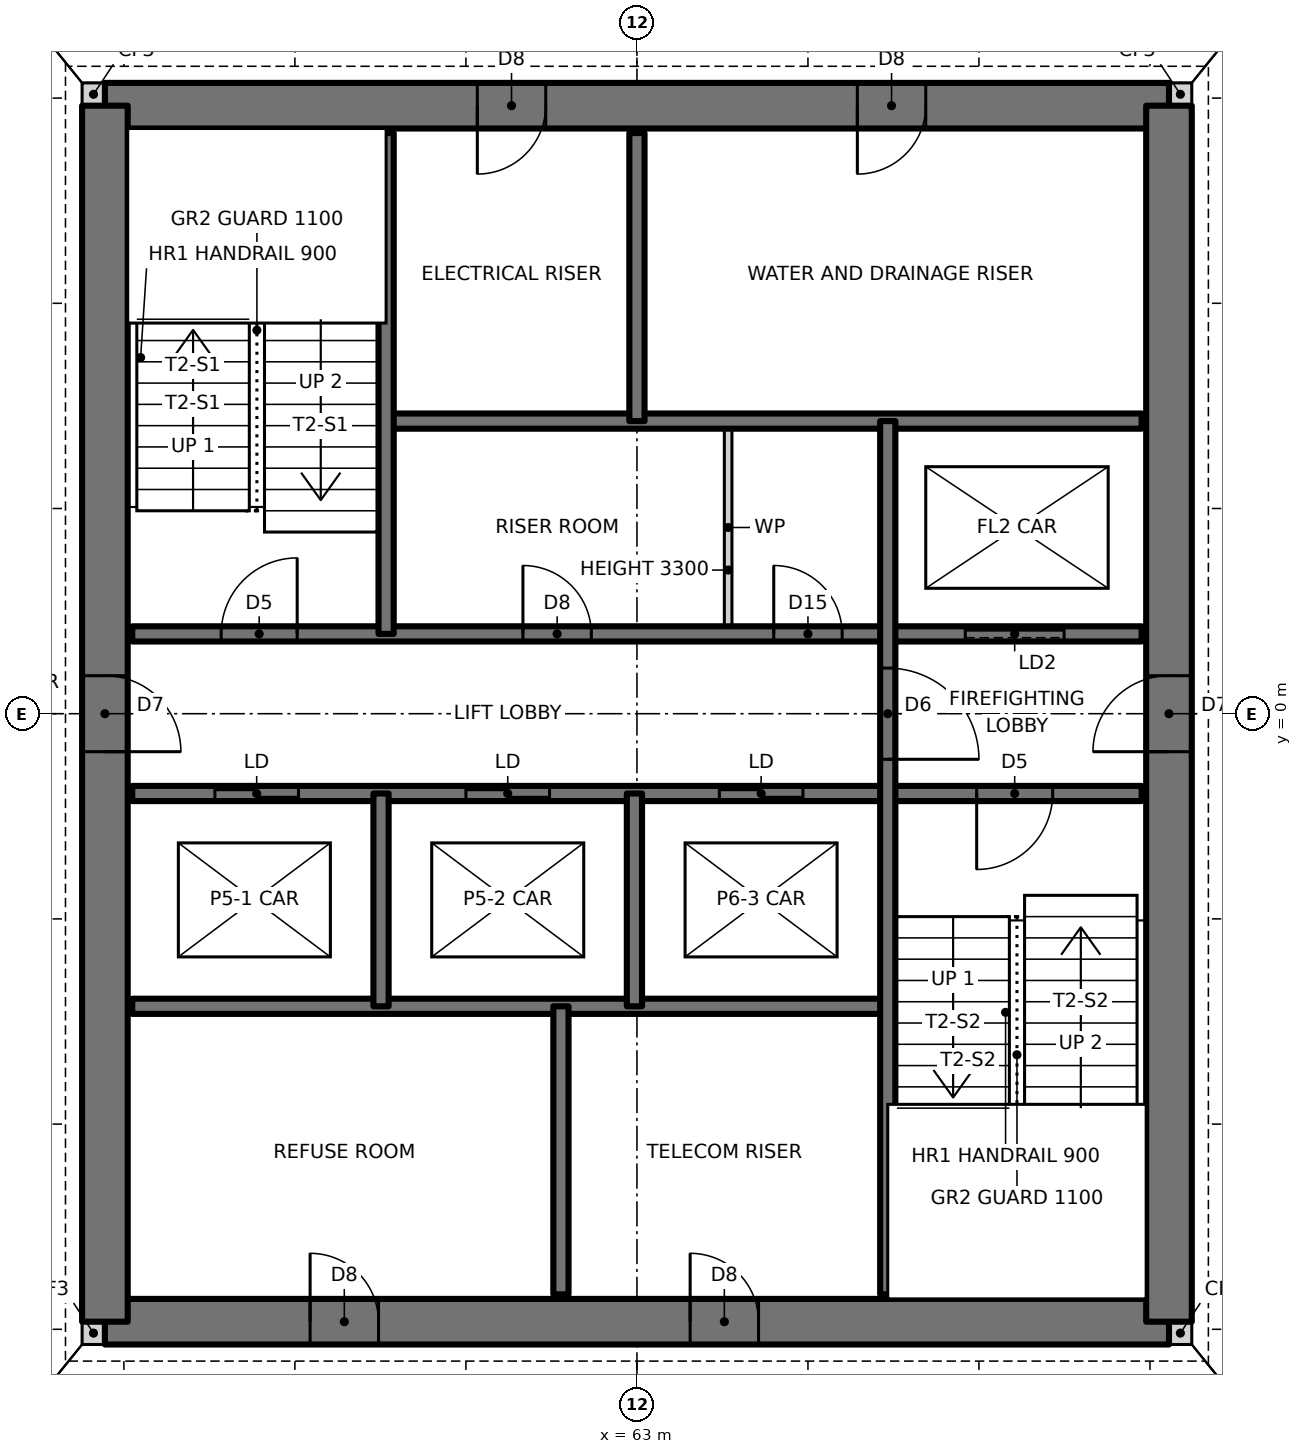
"""IFC4 building model, lengths in metres.
Left out: names, types, materials, properties, quantities, classifications, styles, units other than length and angle.
Written with IfcOpenShell. Run it as: python <this file> out.ifc"""

import sys

from ifc_helpers import new_model, si_unit, direction, frame, frame_2d, origin, place, context, subcontext, project, spatial, rectangle, extrude, element, fill, save


model = new_model("IFC4")
c1 = context("Model", 3, precision=1e-05, world=origin(), true_north=direction((0.0, 1.0)))
c2 = subcontext(c1, "Body", "Model", "MODEL_VIEW")
j1 = project(units=[si_unit("LENGTHUNIT", "METRE"), si_unit("PLANEANGLEUNIT", "RADIAN")], contexts=[c1])
p1 = place(None, origin())
s1 = spatial("IfcSite", under=j1, at=p1, CompositionType="ELEMENT")
p2 = place(p1, origin())
s2 = spatial("IfcBuilding", under=s1, at=p2, CompositionType="ELEMENT")
p3 = place(p2, frame((0.0, 0.0, 80.5)))
s3 = spatial("IfcBuildingStorey", under=s2, at=p3, CompositionType="ELEMENT", Elevation=80.5)
for number, where, z_axis, x_axis in (
    (1, (55.7, -8.15, 0.0), (0.0, 0.0, 1.0), (1.0, 0.0, 0.0)),
    (2, (70.0, -8.15, 0.0), (0.0, 0.0, 1.0), (1.0, 0.0, 0.0)),
    (3, (70.0, 8.15, 0.0), (0.0, 0.0, 1.0), (1.0, 0.0, 0.0)),
    (4, (55.7, 8.15, 0.0), (0.0, 0.0, 1.0), (1.0, 0.0, 0.0)),
):
    element("IfcWall", number, at=place(p3, frame(where, z_axis=z_axis, x_axis=x_axis)), inside=s3, PredefinedType="SOLIDWALL", context=c2, shape_type="SweptSolid", body=[
        extrude(rectangle(XDim=0.3, YDim=0.3, at=frame_2d((0.15, 0.0))), origin(), (0.0, 0.0, 1.0), 3.5),
    ])
p4 = place(p3, frame((56.0, -8.0, 0.0), z_axis=(0.0, 0.0, 1.0), x_axis=(1.0, 0.0, 0.0)))
e5 = element("IfcWall", 5, at=p4, inside=s3, PredefinedType="SHEAR", context=c2, shape_type="SweptSolid", body=[
    extrude(rectangle(XDim=14.0, YDim=0.6, at=frame_2d((7.0, 0.0))), origin(), (0.0, 0.0, 1.0), 3.5),
])
p5 = place(p4, frame((2.7, 0.0, 0.0)))
e6 = element("IfcOpeningElement", 6, at=p5, cuts=e5, PredefinedType="OPENING", context=c2, shape_type="SweptSolid", body=[
    extrude(rectangle(XDim=0.9, YDim=2.1, at=frame_2d((0.45, 1.05))), frame((0.0, 0.31, 0.0), z_axis=(0.0, -1.0, 0.0), x_axis=(1.0, 0.0, 0.0)), (0.0, 0.0, 1.0), 0.62),
])
p6 = place(p4, frame((7.7, 0.0, 0.0)))
e7 = element("IfcOpeningElement", 7, at=p6, cuts=e5, PredefinedType="OPENING", context=c2, shape_type="SweptSolid", body=[
    extrude(rectangle(XDim=0.9, YDim=2.1, at=frame_2d((0.45, 1.05))), frame((0.0, 0.31, 0.0), z_axis=(0.0, -1.0, 0.0), x_axis=(1.0, 0.0, 0.0)), (0.0, 0.0, 1.0), 0.62),
])
p7 = place(p3, frame((70.0, 8.0, 0.0), z_axis=(0.0, 0.0, 1.0), x_axis=(-1.0, 0.0, 0.0)))
e8 = element("IfcWall", 8, at=p7, inside=s3, PredefinedType="SHEAR", context=c2, shape_type="SweptSolid", body=[
    extrude(rectangle(XDim=14.0, YDim=0.6, at=frame_2d((7.0, 0.0))), origin(), (0.0, 0.0, 1.0), 3.5),
])
p8 = place(p7, frame((8.2, 0.0, 0.0)))
e9 = element("IfcOpeningElement", 9, at=p8, cuts=e8, PredefinedType="OPENING", context=c2, shape_type="SweptSolid", body=[
    extrude(rectangle(XDim=0.9, YDim=2.1, at=frame_2d((0.45, 1.05))), frame((0.0, 0.31, 0.0), z_axis=(0.0, -1.0, 0.0), x_axis=(1.0, 0.0, 0.0)), (0.0, 0.0, 1.0), 0.62),
])
p9 = place(p7, frame((3.2, 0.0, 0.0)))
e10 = element("IfcOpeningElement", 10, at=p9, cuts=e8, PredefinedType="OPENING", context=c2, shape_type="SweptSolid", body=[
    extrude(rectangle(XDim=0.9, YDim=2.1, at=frame_2d((0.45, 1.05))), frame((0.0, 0.31, 0.0), z_axis=(0.0, -1.0, 0.0), x_axis=(1.0, 0.0, 0.0)), (0.0, 0.0, 1.0), 0.62),
])
p10 = place(p3, frame((70.0, -8.0, 0.0), z_axis=(0.0, 0.0, 1.0), x_axis=(0.0, 1.0, 0.0)))
e11 = element("IfcWall", 11, at=p10, inside=s3, PredefinedType="SHEAR", context=c2, shape_type="SweptSolid", body=[
    extrude(rectangle(XDim=16.0, YDim=0.6, at=frame_2d((8.0, 0.0))), origin(), (0.0, 0.0, 1.0), 3.5),
])
p11 = place(p10, frame((7.5, 0.0, 0.0)))
e12 = element("IfcOpeningElement", 12, at=p11, cuts=e11, PredefinedType="OPENING", context=c2, shape_type="SweptSolid", body=[
    extrude(rectangle(XDim=1.0, YDim=2.1, at=frame_2d((0.5, 1.05))), frame((0.0, 0.31, 0.0), z_axis=(0.0, -1.0, 0.0), x_axis=(1.0, 0.0, 0.0)), (0.0, 0.0, 1.0), 0.62),
])
p12 = place(p3, frame((56.0, 8.0, 0.0), z_axis=(0.0, 0.0, 1.0), x_axis=(0.0, -1.0, 0.0)))
e13 = element("IfcWall", 13, at=p12, inside=s3, PredefinedType="SHEAR", context=c2, shape_type="SweptSolid", body=[
    extrude(rectangle(XDim=16.0, YDim=0.6, at=frame_2d((8.0, 0.0))), origin(), (0.0, 0.0, 1.0), 3.5),
])
p13 = place(p12, frame((7.5, 0.0, 0.0)))
e14 = element("IfcOpeningElement", 14, at=p13, cuts=e13, PredefinedType="OPENING", context=c2, shape_type="SweptSolid", body=[
    extrude(rectangle(XDim=1.0, YDim=2.1, at=frame_2d((0.5, 1.05))), frame((0.0, 0.31, 0.0), z_axis=(0.0, -1.0, 0.0), x_axis=(1.0, 0.0, 0.0)), (0.0, 0.0, 1.0), 0.62),
])
p14 = place(p3, frame((56.36, -3.85, 0.0), z_axis=(0.0, 0.0, 1.0), x_axis=(1.0, 0.0, 0.0)))
e15 = element("IfcWall", 15, at=p14, inside=s3, PredefinedType="SOLIDWALL", context=c2, shape_type="SweptSolid", body=[
    extrude(rectangle(XDim=9.94, YDim=0.2, at=frame_2d((4.97, 0.0))), origin(), (0.0, 0.0, 1.0), 3.5),
])
p15 = place(p3, frame((56.36, -1.05, 0.0), z_axis=(0.0, 0.0, 1.0), x_axis=(1.0, 0.0, 0.0)))
e16 = element("IfcWall", 16, at=p15, inside=s3, PredefinedType="SOLIDWALL", context=c2, shape_type="SweptSolid", body=[
    extrude(rectangle(XDim=13.28, YDim=0.2, at=frame_2d((6.64, 0.0))), origin(), (0.0, 0.0, 1.0), 3.5),
])
p16 = place(p15, frame((11.11, 0.0, 0.0)))
e17 = element("IfcOpeningElement", 17, at=p16, cuts=e16, PredefinedType="OPENING", context=c2, shape_type="SweptSolid", body=[
    extrude(rectangle(XDim=1.0, YDim=2.1, at=frame_2d((0.5, 1.05))), frame((0.0, 0.11, 0.0), z_axis=(0.0, -1.0, 0.0), x_axis=(1.0, 0.0, 0.0)), (0.0, 0.0, 1.0), 0.22),
])
p17 = place(p15, frame((1.087, 0.0, 0.0)))
e18 = element("IfcOpeningElement", 18, at=p17, cuts=e16, PredefinedType="OPENING", context=c2, shape_type="SweptSolid", body=[
    extrude(rectangle(XDim=1.1, YDim=2.1, at=frame_2d((0.55, 1.05))), frame((0.0, 0.11, 0.0), z_axis=(0.0, -1.0, 0.0), x_axis=(1.0, 0.0, 0.0)), (0.0, 0.0, 1.0), 0.22),
])
p18 = place(p15, frame((4.39, 0.0, 0.0)))
e19 = element("IfcOpeningElement", 19, at=p18, cuts=e16, PredefinedType="OPENING", context=c2, shape_type="SweptSolid", body=[
    extrude(rectangle(XDim=1.1, YDim=2.1, at=frame_2d((0.55, 1.05))), frame((0.0, 0.11, 0.0), z_axis=(0.0, -1.0, 0.0), x_axis=(1.0, 0.0, 0.0)), (0.0, 0.0, 1.0), 0.22),
])
p19 = place(p15, frame((7.724, 0.0, 0.0)))
e20 = element("IfcOpeningElement", 20, at=p19, cuts=e16, PredefinedType="OPENING", context=c2, shape_type="SweptSolid", body=[
    extrude(rectangle(XDim=1.1, YDim=2.1, at=frame_2d((0.55, 1.05))), frame((0.0, 0.11, 0.0), z_axis=(0.0, -1.0, 0.0), x_axis=(1.0, 0.0, 0.0)), (0.0, 0.0, 1.0), 0.22),
])
p20 = place(p3, frame((56.36, 1.05, 0.0), z_axis=(0.0, 0.0, 1.0), x_axis=(1.0, 0.0, 0.0)))
e21 = element("IfcWall", 21, at=p20, inside=s3, PredefinedType="SOLIDWALL", context=c2, shape_type="SweptSolid", body=[
    extrude(rectangle(XDim=13.28, YDim=0.2, at=frame_2d((6.64, 0.0))), origin(), (0.0, 0.0, 1.0), 3.5),
])
p21 = place(p20, frame((1.17, 0.0, 0.0)))
e22 = element("IfcOpeningElement", 22, at=p21, cuts=e21, PredefinedType="OPENING", context=c2, shape_type="SweptSolid", body=[
    extrude(rectangle(XDim=1.0, YDim=2.1, at=frame_2d((0.5, 1.05))), frame((0.0, 0.11, 0.0), z_axis=(0.0, -1.0, 0.0), x_axis=(1.0, 0.0, 0.0)), (0.0, 0.0, 1.0), 0.22),
])
p22 = place(p20, frame((5.14, 0.0, 0.0)))
e23 = element("IfcOpeningElement", 23, at=p22, cuts=e21, PredefinedType="OPENING", context=c2, shape_type="SweptSolid", body=[
    extrude(rectangle(XDim=0.9, YDim=2.1, at=frame_2d((0.45, 1.05))), frame((0.0, 0.11, 0.0), z_axis=(0.0, -1.0, 0.0), x_axis=(1.0, 0.0, 0.0)), (0.0, 0.0, 1.0), 0.22),
])
p23 = place(p20, frame((8.44, 0.0, 0.0)))
e24 = element("IfcOpeningElement", 24, at=p23, cuts=e21, PredefinedType="OPENING", context=c2, shape_type="SweptSolid", body=[
    extrude(rectangle(XDim=0.9, YDim=2.1, at=frame_2d((0.45, 1.05))), frame((0.0, 0.11, 0.0), z_axis=(0.0, -1.0, 0.0), x_axis=(1.0, 0.0, 0.0)), (0.0, 0.0, 1.0), 0.22),
])
p24 = place(p20, frame((10.96, 0.0, 0.0)))
e25 = element("IfcOpeningElement", 25, at=p24, cuts=e21, PredefinedType="OPENING", context=c2, shape_type="SweptSolid", body=[
    extrude(rectangle(XDim=1.3, YDim=2.1, at=frame_2d((0.65, 1.05))), frame((0.0, 0.11, 0.0), z_axis=(0.0, -1.0, 0.0), x_axis=(1.0, 0.0, 0.0)), (0.0, 0.0, 1.0), 0.22),
])
p25 = place(p3, frame((59.7, 3.85, 0.0), z_axis=(0.0, 0.0, 1.0), x_axis=(1.0, 0.0, 0.0)))
e26 = element("IfcWall", 26, at=p25, inside=s3, PredefinedType="SOLIDWALL", context=c2, shape_type="SweptSolid", body=[
    extrude(rectangle(XDim=9.94, YDim=0.2, at=frame_2d((4.97, 0.0))), origin(), (0.0, 0.0, 1.0), 3.5),
])
p26 = place(p3, frame((66.3, -7.64, 0.0), z_axis=(0.0, 0.0, 1.0), x_axis=(0.0, 1.0, 0.0)))
e27 = element("IfcWall", 27, at=p26, inside=s3, PredefinedType="SOLIDWALL", context=c2, shape_type="SweptSolid", body=[
    extrude(rectangle(XDim=11.49, YDim=0.2, at=frame_2d((5.745, 0.0))), origin(), (0.0, 0.0, 1.0), 3.5),
])
p27 = place(p26, frame((7.04, 0.0, 0.0)))
e28 = element("IfcOpeningElement", 28, at=p27, cuts=e27, PredefinedType="OPENING", context=c2, shape_type="SweptSolid", body=[
    extrude(rectangle(XDim=1.2, YDim=2.1, at=frame_2d((0.6, 1.05))), frame((0.0, 0.11, 0.0), z_axis=(0.0, -1.0, 0.0), x_axis=(1.0, 0.0, 0.0)), (0.0, 0.0, 1.0), 0.22),
])
p28 = place(p3, frame((64.2, 1.05, 0.0), z_axis=(0.0, 0.0, 1.0), x_axis=(0.0, 1.0, 0.0)))
e29 = element("IfcWall", 29, at=p28, inside=s3, PredefinedType="PARTITIONING", context=c2, shape_type="SweptSolid", body=[
    extrude(rectangle(XDim=2.8, YDim=0.1, at=frame_2d((1.4, 0.0))), origin(), (0.0, 0.0, 1.0), 3.3),
])
p29 = place(p3, frame((63.0, 3.85, 0.0), z_axis=(0.0, 0.0, 1.0), x_axis=(0.0, 1.0, 0.0)))
e30 = element("IfcWall", 30, at=p29, inside=s3, PredefinedType="SOLIDWALL", context=c2, shape_type="SweptSolid", body=[
    extrude(rectangle(XDim=3.79, YDim=0.2, at=frame_2d((1.895, 0.0))), origin(), (0.0, 0.0, 1.0), 3.5),
])
p30 = place(p3, frame((62.967, -3.85, 0.0), z_axis=(0.0, 0.0, 1.0), x_axis=(0.0, 1.0, 0.0)))
e31 = element("IfcWall", 31, at=p30, inside=s3, PredefinedType="SOLIDWALL", context=c2, shape_type="SweptSolid", body=[
    extrude(rectangle(XDim=2.8, YDim=0.2, at=frame_2d((1.4, 0.0))), origin(), (0.0, 0.0, 1.0), 3.5),
])
p31 = place(p3, frame((62.0, -7.64, 0.0), z_axis=(0.0, 0.0, 1.0), x_axis=(0.0, 1.0, 0.0)))
e32 = element("IfcWall", 32, at=p31, inside=s3, PredefinedType="SOLIDWALL", context=c2, shape_type="SweptSolid", body=[
    extrude(rectangle(XDim=3.79, YDim=0.2, at=frame_2d((1.895, 0.0))), origin(), (0.0, 0.0, 1.0), 3.5),
])
p32 = place(p3, frame((59.7, 1.05, 0.0), z_axis=(0.0, 0.0, 1.0), x_axis=(0.0, 1.0, 0.0)))
e33 = element("IfcWall", 33, at=p32, inside=s3, PredefinedType="SOLIDWALL", context=c2, shape_type="SweptSolid", body=[
    extrude(rectangle(XDim=6.59, YDim=0.2, at=frame_2d((3.295, 0.0))), origin(), (0.0, 0.0, 1.0), 3.5),
])
p33 = place(p3, frame((59.633, -3.85, 0.0), z_axis=(0.0, 0.0, 1.0), x_axis=(0.0, 1.0, 0.0)))
e34 = element("IfcWall", 34, at=p33, inside=s3, PredefinedType="SOLIDWALL", context=c2, shape_type="SweptSolid", body=[
    extrude(rectangle(XDim=2.8, YDim=0.2, at=frame_2d((1.4, 0.0))), origin(), (0.0, 0.0, 1.0), 3.5),
])
p34 = place(p21, origin())
e35 = element("IfcDoor", 35, at=p34, inside=s3, OperationType="SINGLE_SWING_RIGHT", PredefinedType="DOOR", context=c2, shape_type="SweptSolid", body=[
    extrude(rectangle(XDim=1.0, YDim=2.1, at=frame_2d((0.5, 1.05))), frame((0.0, 0.025, 0.0), z_axis=(0.0, -1.0, 0.0), x_axis=(1.0, 0.0, 0.0)), (0.0, 0.0, 1.0), 0.05),
])
fill(e22, e35)
p35 = place(p16, frame((1.0, 0.0, 0.0), z_axis=(0.0, 0.0, 1.0), x_axis=(-1.0, 0.0, 0.0)))
e36 = element("IfcDoor", 36, at=p35, inside=s3, OperationType="SINGLE_SWING_RIGHT", PredefinedType="DOOR", context=c2, shape_type="SweptSolid", body=[
    extrude(rectangle(XDim=1.0, YDim=2.1, at=frame_2d((0.5, 1.05))), frame((0.0, 0.025, 0.0), z_axis=(0.0, -1.0, 0.0), x_axis=(1.0, 0.0, 0.0)), (0.0, 0.0, 1.0), 0.05),
])
fill(e17, e36)
p36 = place(p27, frame((1.2, 0.0, 0.0), z_axis=(0.0, 0.0, 1.0), x_axis=(-1.0, 0.0, 0.0)))
e37 = element("IfcDoor", 37, at=p36, inside=s3, OperationType="SINGLE_SWING_RIGHT", PredefinedType="DOOR", context=c2, shape_type="SweptSolid", body=[
    extrude(rectangle(XDim=1.2, YDim=2.1, at=frame_2d((0.6, 1.05))), frame((0.0, 0.025, 0.0), z_axis=(0.0, -1.0, 0.0), x_axis=(1.0, 0.0, 0.0)), (0.0, 0.0, 1.0), 0.05),
])
fill(e28, e37)
p37 = place(p22, origin())
e38 = element("IfcDoor", 38, at=p37, inside=s3, OperationType="SINGLE_SWING_LEFT", PredefinedType="DOOR", context=c2, shape_type="SweptSolid", body=[
    extrude(rectangle(XDim=0.9, YDim=2.1, at=frame_2d((0.45, 1.05))), frame((0.0, 0.025, 0.0), z_axis=(0.0, -1.0, 0.0), x_axis=(1.0, 0.0, 0.0)), (0.0, 0.0, 1.0), 0.05),
])
fill(e23, e38)
p38 = place(p23, origin())
e39 = element("IfcDoor", 39, at=p38, inside=s3, OperationType="SINGLE_SWING_LEFT", PredefinedType="DOOR", context=c2, shape_type="SweptSolid", body=[
    extrude(rectangle(XDim=0.9, YDim=2.1, at=frame_2d((0.45, 1.05))), frame((0.0, 0.025, 0.0), z_axis=(0.0, -1.0, 0.0), x_axis=(1.0, 0.0, 0.0)), (0.0, 0.0, 1.0), 0.05),
])
fill(e24, e39)
p39 = place(p13, origin())
e40 = element("IfcDoor", 40, at=p39, inside=s3, OperationType="SINGLE_SWING_RIGHT", PredefinedType="DOOR", context=c2, shape_type="SweptSolid", body=[
    extrude(rectangle(XDim=1.0, YDim=2.1, at=frame_2d((0.5, 1.05))), frame((0.0, 0.025, 0.0), z_axis=(0.0, -1.0, 0.0), x_axis=(1.0, 0.0, 0.0)), (0.0, 0.0, 1.0), 0.05),
])
fill(e14, e40)
p40 = place(p11, origin())
e41 = element("IfcDoor", 41, at=p40, inside=s3, OperationType="SINGLE_SWING_LEFT", PredefinedType="DOOR", context=c2, shape_type="SweptSolid", body=[
    extrude(rectangle(XDim=1.0, YDim=2.1, at=frame_2d((0.5, 1.05))), frame((0.0, 0.025, 0.0), z_axis=(0.0, -1.0, 0.0), x_axis=(1.0, 0.0, 0.0)), (0.0, 0.0, 1.0), 0.05),
])
fill(e12, e41)
p41 = place(p8, origin())
e42 = element("IfcDoor", 42, at=p41, inside=s3, OperationType="SINGLE_SWING_RIGHT", PredefinedType="DOOR", context=c2, shape_type="SweptSolid", body=[
    extrude(rectangle(XDim=0.9, YDim=2.1, at=frame_2d((0.45, 1.05))), frame((0.0, 0.025, 0.0), z_axis=(0.0, -1.0, 0.0), x_axis=(1.0, 0.0, 0.0)), (0.0, 0.0, 1.0), 0.05),
])
fill(e9, e42)
p42 = place(p9, origin())
e43 = element("IfcDoor", 43, at=p42, inside=s3, OperationType="SINGLE_SWING_RIGHT", PredefinedType="DOOR", context=c2, shape_type="SweptSolid", body=[
    extrude(rectangle(XDim=0.9, YDim=2.1, at=frame_2d((0.45, 1.05))), frame((0.0, 0.025, 0.0), z_axis=(0.0, -1.0, 0.0), x_axis=(1.0, 0.0, 0.0)), (0.0, 0.0, 1.0), 0.05),
])
fill(e10, e43)
p43 = place(p5, origin())
e44 = element("IfcDoor", 44, at=p43, inside=s3, OperationType="SINGLE_SWING_LEFT", PredefinedType="DOOR", context=c2, shape_type="SweptSolid", body=[
    extrude(rectangle(XDim=0.9, YDim=2.1, at=frame_2d((0.45, 1.05))), frame((0.0, 0.025, 0.0), z_axis=(0.0, -1.0, 0.0), x_axis=(1.0, 0.0, 0.0)), (0.0, 0.0, 1.0), 0.05),
])
fill(e6, e44)
p44 = place(p6, origin())
e45 = element("IfcDoor", 45, at=p44, inside=s3, OperationType="SINGLE_SWING_LEFT", PredefinedType="DOOR", context=c2, shape_type="SweptSolid", body=[
    extrude(rectangle(XDim=0.9, YDim=2.1, at=frame_2d((0.45, 1.05))), frame((0.0, 0.025, 0.0), z_axis=(0.0, -1.0, 0.0), x_axis=(1.0, 0.0, 0.0)), (0.0, 0.0, 1.0), 0.05),
])
fill(e7, e45)
p45 = place(p17, origin())
e46 = element("IfcDoor", 46, at=p45, inside=s3, OperationType="DOUBLE_DOOR_SLIDING", PredefinedType="DOOR", context=c2, shape_type="SweptSolid", body=[
    extrude(rectangle(XDim=1.1, YDim=2.1, at=frame_2d((0.55, 1.05))), frame((0.0, 0.025, 0.0), z_axis=(0.0, -1.0, 0.0), x_axis=(1.0, 0.0, 0.0)), (0.0, 0.0, 1.0), 0.05),
])
fill(e18, e46)
p46 = place(p18, origin())
e47 = element("IfcDoor", 47, at=p46, inside=s3, OperationType="DOUBLE_DOOR_SLIDING", PredefinedType="DOOR", context=c2, shape_type="SweptSolid", body=[
    extrude(rectangle(XDim=1.1, YDim=2.1, at=frame_2d((0.55, 1.05))), frame((0.0, 0.025, 0.0), z_axis=(0.0, -1.0, 0.0), x_axis=(1.0, 0.0, 0.0)), (0.0, 0.0, 1.0), 0.05),
])
fill(e19, e47)
p47 = place(p19, origin())
e48 = element("IfcDoor", 48, at=p47, inside=s3, OperationType="DOUBLE_DOOR_SLIDING", PredefinedType="DOOR", context=c2, shape_type="SweptSolid", body=[
    extrude(rectangle(XDim=1.1, YDim=2.1, at=frame_2d((0.55, 1.05))), frame((0.0, 0.025, 0.0), z_axis=(0.0, -1.0, 0.0), x_axis=(1.0, 0.0, 0.0)), (0.0, 0.0, 1.0), 0.05),
])
fill(e20, e48)
p48 = place(p24, origin())
e49 = element("IfcDoor", 49, at=p48, inside=s3, OperationType="SLIDING_TO_LEFT", PredefinedType="DOOR", context=c2, shape_type="SweptSolid", body=[
    extrude(rectangle(XDim=1.3, YDim=2.1, at=frame_2d((0.65, 1.05))), frame((0.0, 0.025, 0.0), z_axis=(0.0, -1.0, 0.0), x_axis=(1.0, 0.0, 0.0)), (0.0, 0.0, 1.0), 0.05),
])
fill(e25, e49)
save(model, sys.argv[1])
